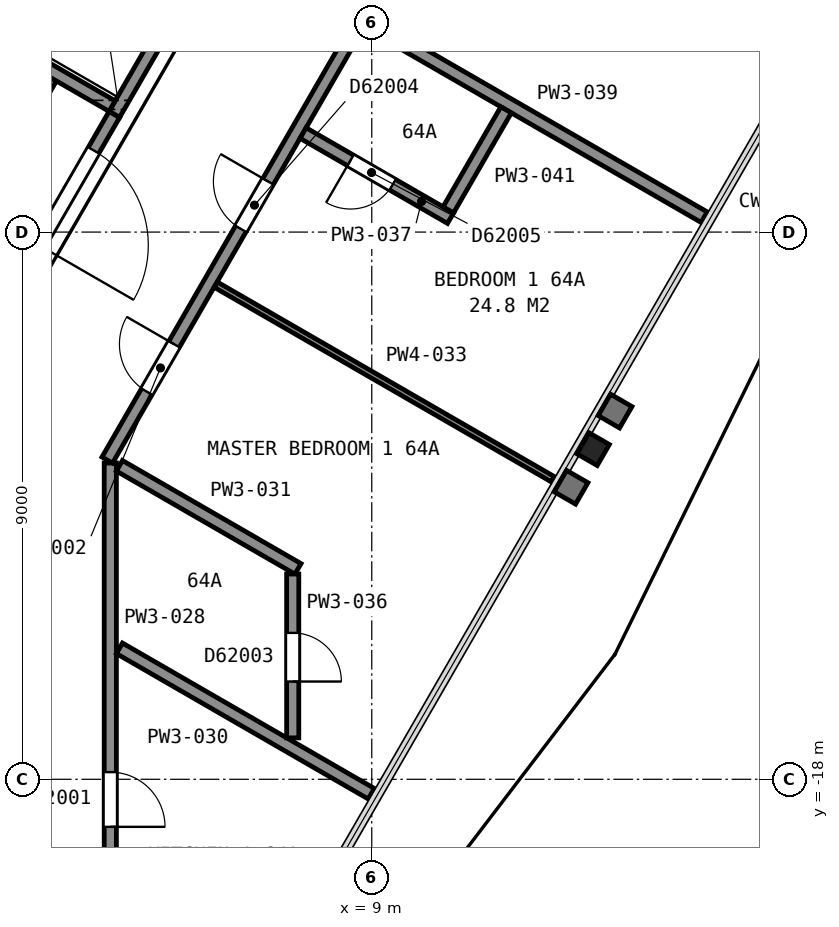
"""IFC4 building model, lengths in metres.
Left out: names, types, materials, properties, quantities, classifications, styles, units other than length and angle.
Written with IfcOpenShell. Run it as: python <this file> out.ifc"""

import sys

from ifc_helpers import new_model, si_unit, direction, frame, frame_2d, origin, origin_2d, place, context, subcontext, project, spatial, rectangle, i_section, extrude, element, fill, save


model = new_model("IFC4")
c1 = context("Model", 3, precision=1e-05, world=origin(), true_north=direction((0.0, 1.0)))
c2 = subcontext(c1, "Body", "Model", "MODEL_VIEW")
j1 = project(units=[si_unit("LENGTHUNIT", "METRE"), si_unit("PLANEANGLEUNIT", "RADIAN")], contexts=[c1])
p1 = place(None, origin())
s1 = spatial("IfcSite", under=j1, at=p1, CompositionType="ELEMENT")
p2 = place(p1, origin())
s2 = spatial("IfcBuilding", under=s1, at=p2, CompositionType="ELEMENT")
p3 = place(p2, frame((0.0, 0.0, 254.5)))
s3 = spatial("IfcBuildingStorey", under=s2, at=p3, CompositionType="ELEMENT", Elevation=254.5)
p4 = place(p3, frame((12.64, -12.57, 0.0), z_axis=(0.0, 0.0, 1.0), x_axis=(-0.5, -0.866025403784, 0.0)))
e1 = element("IfcColumn", 1, at=p4, inside=s3, PredefinedType="COLUMN", context=c2, shape_type="SweptSolid", body=[
    extrude(i_section(OverallWidth=0.399, OverallDepth=0.386, WebThickness=0.021, FlangeThickness=0.033, FilletRadius=0.015, at=origin_2d()), origin(), (0.0, 0.0, 1.0), 3.01),
])
p5 = place(p3, frame((4.766, -7.065, 0.0), z_axis=(0.0, 0.0, 1.0), x_axis=(0.499948979701, 0.866054858364, 0.0)))
e2 = element("IfcWall", 2, at=p5, inside=s3, PredefinedType="PARTITIONING", context=c2, shape_type="SweptSolid", body=[
    extrude(rectangle(XDim=2.55, YDim=0.2, at=frame_2d((1.275, 0.0))), origin(), (0.0, 0.0, 1.0), 3.7),
])
p6 = place(p3, frame((2.552, -8.5, 0.0), z_axis=(0.0, 0.0, 1.0), x_axis=(0.500016218704, 0.866016039709, 0.0)))
e3 = element("IfcWall", 3, at=p6, inside=s3, PredefinedType="PARTITIONING", context=c2, shape_type="SweptSolid", body=[
    extrude(rectangle(XDim=2.35, YDim=0.2, at=frame_2d((1.175, 0.0))), origin(), (0.0, 0.0, 1.0), 3.7),
])
p7 = place(p3, frame((4.73, -6.928, 0.0), z_axis=(0.0, 0.0, 1.0), x_axis=(-0.866024349092, 0.500001826776, 0.0)))
e4 = element("IfcWall", 4, at=p7, inside=s3, PredefinedType="PARTITIONING", context=c2, shape_type="SweptSolid", body=[
    extrude(rectangle(XDim=2.95, YDim=0.2, at=frame_2d((1.475, 0.0))), origin(), (0.0, 0.0, 1.0), 3.7),
])
p8 = place(p3, frame((1.677, -12.415, 0.0), z_axis=(0.0, 0.0, 1.0), x_axis=(0.500054337157, 0.865994029939, 0.0)))
e5 = element("IfcWall", 5, at=p8, inside=s3, PredefinedType="PARTITIONING", context=c2, shape_type="SweptSolid", body=[
    extrude(rectangle(XDim=6.177, YDim=0.2, at=frame_2d((3.088, 0.0))), origin(), (0.0, 0.0, 1.0), 3.45),
])
p9 = place(p8, frame((3.695, 0.0, 0.0)))
e6 = element("IfcOpeningElement", 6, at=p9, cuts=e5, PredefinedType="OPENING", context=c2, shape_type="SweptSolid", body=[
    extrude(rectangle(XDim=1.8, YDim=2.1, at=frame_2d((0.9, 1.05))), frame((0.0, 0.11, 0.0), z_axis=(0.0, -1.0, 0.0), x_axis=(1.0, 0.0, 0.0)), (0.0, 0.0, 1.0), 0.22),
])
p10 = place(p3, frame((4.7, -12.798, 0.0), z_axis=(0.0, 0.0, 1.0), x_axis=(0.0, -1.0, 0.0)))
e7 = element("IfcWall", 7, at=p10, inside=s3, PredefinedType="PARTITIONING", context=c2, shape_type="SweptSolid", body=[
    extrude(rectangle(XDim=8.452, YDim=0.2, at=frame_2d((4.226, 0.0))), origin(), (0.0, 0.0, 1.0), 2.362),
])
p11 = place(p10, frame((5.084, 0.0, 0.0)))
e8 = element("IfcOpeningElement", 8, at=p11, cuts=e7, PredefinedType="OPENING", context=c2, shape_type="SweptSolid", body=[
    extrude(rectangle(XDim=0.9, YDim=2.1, at=frame_2d((0.45, 1.05))), frame((0.0, 0.11, 0.0), z_axis=(0.0, -1.0, 0.0), x_axis=(1.0, 0.0, 0.0)), (0.0, 0.0, 1.0), 0.22),
])
p12 = place(p3, frame((4.85, -15.846, 0.0), z_axis=(0.0, 0.0, 1.0), x_axis=(0.866007055173, -0.500031779381, 0.0)))
e9 = element("IfcWall", 9, at=p12, inside=s3, PredefinedType="PARTITIONING", context=c2, shape_type="SweptSolid", body=[
    extrude(rectangle(XDim=4.782, YDim=0.2, at=frame_2d((2.391, 0.0))), origin(), (0.0, 0.0, 1.0), 2.362),
])
p13 = place(p3, frame((4.85, -12.844, 0.0), z_axis=(0.0, 0.0, 1.0), x_axis=(0.866005731893, -0.500034071167, 0.0)))
e10 = element("IfcWall", 10, at=p13, inside=s3, PredefinedType="PARTITIONING", context=c2, shape_type="SweptSolid", body=[
    extrude(rectangle(XDim=3.391, YDim=0.2, at=frame_2d((1.695, 0.0))), origin(), (0.0, 0.0, 1.0), 2.362),
])
p14 = place(p3, frame((13.342, 2.306, 0.0), z_axis=(0.0, 0.0, 1.0), x_axis=(-0.499983003136, -0.866035216706, 0.0)))
e11 = element("IfcWall", 11, at=p14, inside=s3, PredefinedType="PARTITIONING", context=c2, shape_type="SweptSolid", body=[
    extrude(rectangle(XDim=17.385, YDim=0.2, at=frame_2d((8.692, 0.0))), origin(), (0.0, 0.0, 1.0), 2.362),
])
p15 = place(p14, frame((15.185, 0.0, 0.0)))
e12 = element("IfcOpeningElement", 12, at=p15, cuts=e11, PredefinedType="OPENING", context=c2, shape_type="SweptSolid", body=[
    extrude(rectangle(XDim=0.9, YDim=2.1, at=frame_2d((0.45, 1.05))), frame((0.0, 0.11, 0.0), z_axis=(0.0, -1.0, 0.0), x_axis=(1.0, 0.0, 0.0)), (0.0, 0.0, 1.0), 0.22),
])
p16 = place(p14, frame((12.094, 0.0, 0.0)))
e13 = element("IfcOpeningElement", 13, at=p16, cuts=e11, PredefinedType="OPENING", context=c2, shape_type="SweptSolid", body=[
    extrude(rectangle(XDim=0.9, YDim=2.1, at=frame_2d((0.45, 1.05))), frame((0.0, 0.11, 0.0), z_axis=(0.0, -1.0, 0.0), x_axis=(1.0, 0.0, 0.0)), (0.0, 0.0, 1.0), 0.22),
])
p17 = place(p14, frame((5.867, 0.0, 0.0)))
e14 = element("IfcOpeningElement", 14, at=p17, cuts=e11, PredefinedType="OPENING", context=c2, shape_type="SweptSolid", body=[
    extrude(rectangle(XDim=0.9, YDim=2.1, at=frame_2d((0.45, 1.05))), frame((0.0, 0.11, 0.0), z_axis=(0.0, -1.0, 0.0), x_axis=(1.0, 0.0, 0.0)), (0.0, 0.0, 1.0), 0.22),
])
p18 = place(p14, frame((1.392, 0.0, 0.0)))
e15 = element("IfcOpeningElement", 15, at=p18, cuts=e11, PredefinedType="OPENING", context=c2, shape_type="SweptSolid", body=[
    extrude(rectangle(XDim=0.9, YDim=2.1, at=frame_2d((0.45, 1.05))), frame((0.0, 0.11, 0.0), z_axis=(0.0, -1.0, 0.0), x_axis=(1.0, 0.0, 0.0)), (0.0, 0.0, 1.0), 0.22),
])
p19 = place(p3, frame((6.436, -9.865, 0.0), z_axis=(0.0, 0.0, 1.0), x_axis=(0.866013405822, -0.500020780506, 0.0)))
e16 = element("IfcWall", 16, at=p19, inside=s3, PredefinedType="PARTITIONING", context=c2, shape_type="SweptSolid", body=[
    extrude(rectangle(XDim=6.399, YDim=0.1, at=frame_2d((3.2, 0.0))), origin(), (0.0, 0.0, 1.0), 2.362),
])
p20 = place(p3, frame((7.7, -17.319, 0.0), z_axis=(0.0, 0.0, 1.0), x_axis=(0.0, 1.0, 0.0)))
e17 = element("IfcWall", 17, at=p20, inside=s3, PredefinedType="PARTITIONING", context=c2, shape_type="SweptSolid", body=[
    extrude(rectangle(XDim=2.695, YDim=0.2, at=frame_2d((1.347, 0.0))), origin(), (0.0, 0.0, 1.0), 2.362),
])
p21 = place(p20, frame((0.927, 0.0, 0.0)))
e18 = element("IfcOpeningElement", 18, at=p21, cuts=e17, PredefinedType="OPENING", context=c2, shape_type="SweptSolid", body=[
    extrude(rectangle(XDim=0.8, YDim=2.1, at=frame_2d((0.4, 1.05))), frame((0.0, 0.11, 0.0), z_axis=(0.0, -1.0, 0.0), x_axis=(1.0, 0.0, 0.0)), (0.0, 0.0, 1.0), 0.22),
])
p22 = place(p3, frame((7.871, -7.371, 0.0), z_axis=(0.0, 0.0, 1.0), x_axis=(0.866056369097, -0.49994636267, 0.0)))
e19 = element("IfcWall", 19, at=p22, inside=s3, PredefinedType="PARTITIONING", context=c2, shape_type="SweptSolid", body=[
    extrude(rectangle(XDim=2.8, YDim=0.2, at=frame_2d((1.4, 0.0))), origin(), (0.0, 0.0, 1.0), 2.362),
])
p23 = place(p22, frame((0.9, 0.0, 0.0)))
e20 = element("IfcOpeningElement", 20, at=p23, cuts=e19, PredefinedType="OPENING", context=c2, shape_type="SweptSolid", body=[
    extrude(rectangle(XDim=0.8, YDim=2.1, at=frame_2d((0.4, 1.05))), frame((0.0, 0.11, 0.0), z_axis=(0.0, -1.0, 0.0), x_axis=(1.0, 0.0, 0.0)), (0.0, 0.0, 1.0), 0.22),
])
p24 = place(p3, frame((8.921, -5.553, 0.0), z_axis=(0.0, 0.0, 1.0), x_axis=(0.866026868306, -0.499997463366, 0.0)))
e21 = element("IfcWall", 21, at=p24, inside=s3, PredefinedType="PARTITIONING", context=c2, shape_type="SweptSolid", body=[
    extrude(rectangle(XDim=6.404, YDim=0.2, at=frame_2d((3.202, 0.0))), origin(), (0.0, 0.0, 1.0), 2.362),
])
p25 = place(p3, frame((10.259, -8.635, 0.0), z_axis=(0.0, 0.0, 1.0), x_axis=(0.500078449558, 0.865980106173, 0.0)))
e22 = element("IfcWall", 22, at=p25, inside=s3, PredefinedType="PARTITIONING", context=c2, shape_type="SweptSolid", body=[
    extrude(rectangle(XDim=1.9, YDim=0.2, at=frame_2d((0.95, 0.0))), origin(), (0.0, 0.0, 1.0), 2.362),
])
p26 = place(p9, origin())
e23 = element("IfcDoor", 23, at=p26, inside=s3, OperationType="DOUBLE_DOOR_SINGLE_SWING", PredefinedType="DOOR", context=c2, shape_type="SweptSolid", body=[
    extrude(rectangle(XDim=1.8, YDim=2.1, at=frame_2d((0.9, 1.05))), frame((0.0, 0.025, 0.0), z_axis=(0.0, -1.0, 0.0), x_axis=(1.0, 0.0, 0.0)), (0.0, 0.0, 1.0), 0.05),
])
fill(e6, e23)
p27 = place(p11, origin())
e24 = element("IfcDoor", 24, at=p27, inside=s3, OperationType="SINGLE_SWING_RIGHT", PredefinedType="DOOR", context=c2, shape_type="SweptSolid", body=[
    extrude(rectangle(XDim=0.9, YDim=2.1, at=frame_2d((0.45, 1.05))), frame((0.0, 0.025, 0.0), z_axis=(0.0, -1.0, 0.0), x_axis=(1.0, 0.0, 0.0)), (0.0, 0.0, 1.0), 0.05),
])
fill(e8, e24)
p28 = place(p15, origin())
e25 = element("IfcDoor", 25, at=p28, inside=s3, OperationType="SINGLE_SWING_LEFT", PredefinedType="DOOR", context=c2, shape_type="SweptSolid", body=[
    extrude(rectangle(XDim=0.9, YDim=2.1, at=frame_2d((0.45, 1.05))), frame((0.0, 0.025, 0.0), z_axis=(0.0, -1.0, 0.0), x_axis=(1.0, 0.0, 0.0)), (0.0, 0.0, 1.0), 0.05),
])
fill(e12, e25)
p29 = place(p16, origin())
e26 = element("IfcDoor", 26, at=p29, inside=s3, OperationType="SINGLE_SWING_LEFT", PredefinedType="DOOR", context=c2, shape_type="SweptSolid", body=[
    extrude(rectangle(XDim=0.9, YDim=2.1, at=frame_2d((0.45, 1.05))), frame((0.0, 0.025, 0.0), z_axis=(0.0, -1.0, 0.0), x_axis=(1.0, 0.0, 0.0)), (0.0, 0.0, 1.0), 0.05),
])
fill(e13, e26)
p30 = place(p21, origin())
e27 = element("IfcDoor", 27, at=p30, inside=s3, OperationType="SINGLE_SWING_LEFT", PredefinedType="DOOR", context=c2, shape_type="SweptSolid", body=[
    extrude(rectangle(XDim=0.8, YDim=2.1, at=frame_2d((0.4, 1.05))), frame((0.0, 0.025, 0.0), z_axis=(0.0, -1.0, 0.0), x_axis=(1.0, 0.0, 0.0)), (0.0, 0.0, 1.0), 0.05),
])
fill(e18, e27)
p31 = place(p23, origin())
e28 = element("IfcDoor", 28, at=p31, inside=s3, OperationType="SINGLE_SWING_LEFT", PredefinedType="DOOR", context=c2, shape_type="SweptSolid", body=[
    extrude(rectangle(XDim=0.8, YDim=2.1, at=frame_2d((0.4, 1.05))), frame((0.0, 0.025, 0.0), z_axis=(0.0, -1.0, 0.0), x_axis=(1.0, 0.0, 0.0)), (0.0, 0.0, 1.0), 0.05),
])
fill(e20, e28)
save(model, sys.argv[1])
